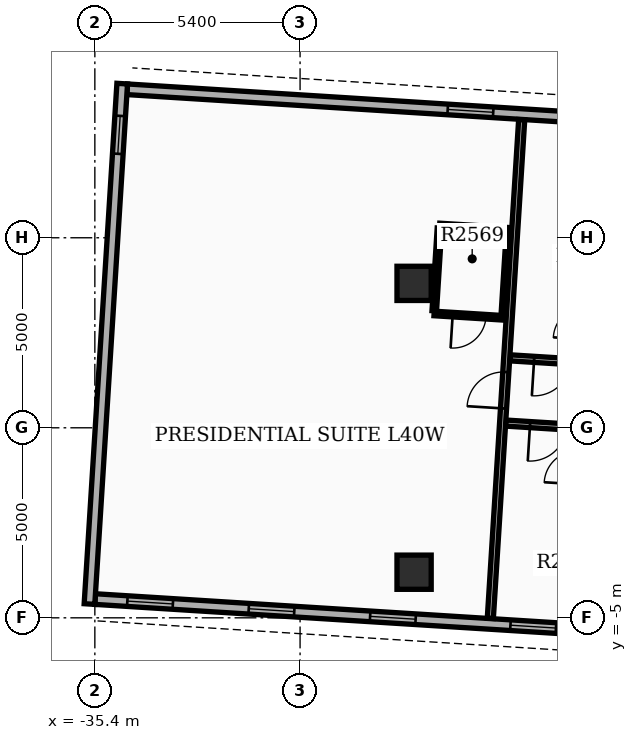
"""IFC4 building model, lengths in metres.
Left out: names, types, materials, properties, quantities, classifications, styles, units other than length and angle.
Written with IfcOpenShell. Run it as: python <this file> out.ifc"""

import sys

from ifc_helpers import new_model, si_unit, direction, frame, frame_2d, origin, origin_2d, place, context, subcontext, project, spatial, rectangle, extrude, element, fill, save


model = new_model("IFC4")
c1 = context("Model", 3, precision=1e-05, world=origin(), true_north=direction((0.0, 1.0)))
c2 = subcontext(c1, "Body", "Model", "MODEL_VIEW")
j1 = project(units=[si_unit("LENGTHUNIT", "METRE"), si_unit("PLANEANGLEUNIT", "RADIAN")], contexts=[c1])
p1 = place(None, origin())
s1 = spatial("IfcSite", under=j1, at=p1, CompositionType="ELEMENT")
p2 = place(p1, origin())
s2 = spatial("IfcBuilding", under=s1, at=p2, CompositionType="ELEMENT")
p3 = place(p2, frame((0.0, 0.0, 160.5)))
s3 = spatial("IfcBuildingStorey", under=s2, at=p3, CompositionType="ELEMENT", Elevation=160.5)
for number, where, z_axis, x_axis in (
    (1, (-27.0, -3.8, 0.0), (0.0, 0.0, 1.0), (1.0, 0.0, 0.0)),
    (2, (-27.0, 3.8, 0.0), (0.0, 0.0, 1.0), (1.0, 0.0, 0.0)),
):
    element("IfcColumn", number, at=place(p3, frame(where, z_axis=z_axis, x_axis=x_axis)), inside=s3, PredefinedType="COLUMN", context=c2, shape_type="SweptSolid", body=[
        extrude(rectangle(XDim=0.9, YDim=0.9, at=origin_2d()), origin(), (0.0, 0.0, 1.0), 3.9),
    ])
p4 = place(p3, frame((-14.489, 7.645, 0.0), z_axis=(0.0, 0.0, 1.0), x_axis=(-0.99802635503, 0.06279645424, 0.0)))
e3 = element("IfcWall", 3, at=p4, inside=s3, PredefinedType="STANDARD", context=c2, shape_type="SweptSolid", body=[
    extrude(rectangle(XDim=20.1, YDim=0.28, at=frame_2d((10.05, 0.0))), origin(), (0.0, 0.0, 1.0), 2.97),
])
p5 = place(p4, frame((0.85, 0.0, 0.8)))
e4 = element("IfcOpeningElement", 4, at=p5, cuts=e3, PredefinedType="OPENING", context=c2, shape_type="SweptSolid", body=[
    extrude(rectangle(XDim=1.2, YDim=1.6, at=frame_2d((0.6, 0.8))), frame((0.0, 0.15, 0.0), z_axis=(0.0, -1.0, 0.0), x_axis=(1.0, 0.0, 0.0)), (0.0, 0.0, 1.0), 0.3),
])
p6 = place(p4, frame((4.05, 0.0, 0.8)))
e5 = element("IfcOpeningElement", 5, at=p6, cuts=e3, PredefinedType="OPENING", context=c2, shape_type="SweptSolid", body=[
    extrude(rectangle(XDim=1.2, YDim=1.6, at=frame_2d((0.6, 0.8))), frame((0.0, 0.15, 0.0), z_axis=(0.0, -1.0, 0.0), x_axis=(1.0, 0.0, 0.0)), (0.0, 0.0, 1.0), 0.3),
])
p7 = place(p4, frame((7.25, 0.0, 0.8)))
e6 = element("IfcOpeningElement", 6, at=p7, cuts=e3, PredefinedType="OPENING", context=c2, shape_type="SweptSolid", body=[
    extrude(rectangle(XDim=1.2, YDim=1.6, at=frame_2d((0.6, 0.8))), frame((0.0, 0.15, 0.0), z_axis=(0.0, -1.0, 0.0), x_axis=(1.0, 0.0, 0.0)), (0.0, 0.0, 1.0), 0.3),
])
p8 = place(p4, frame((10.45, 0.0, 0.8)))
e7 = element("IfcOpeningElement", 7, at=p8, cuts=e3, PredefinedType="OPENING", context=c2, shape_type="SweptSolid", body=[
    extrude(rectangle(XDim=1.2, YDim=1.6, at=frame_2d((0.6, 0.8))), frame((0.0, 0.15, 0.0), z_axis=(0.0, -1.0, 0.0), x_axis=(1.0, 0.0, 0.0)), (0.0, 0.0, 1.0), 0.3),
])
p9 = place(p3, frame((-35.393, -4.507, 0.0), z_axis=(0.0, 0.0, 1.0), x_axis=(0.998027116198, -0.062784355807, 0.0)))
e8 = element("IfcWall", 8, at=p9, inside=s3, PredefinedType="STANDARD", context=c2, shape_type="SweptSolid", body=[
    extrude(rectangle(XDim=20.1, YDim=0.28, at=frame_2d((10.05, 0.0))), origin(), (0.0, 0.0, 1.0), 2.97),
])
p10 = place(p9, frame((0.85, 0.0, 0.8)))
e9 = element("IfcOpeningElement", 9, at=p10, cuts=e8, PredefinedType="OPENING", context=c2, shape_type="SweptSolid", body=[
    extrude(rectangle(XDim=1.2, YDim=1.6, at=frame_2d((0.6, 0.8))), frame((0.0, 0.15, 0.0), z_axis=(0.0, -1.0, 0.0), x_axis=(1.0, 0.0, 0.0)), (0.0, 0.0, 1.0), 0.3),
])
p11 = place(p9, frame((4.05, 0.0, 0.8)))
e10 = element("IfcOpeningElement", 10, at=p11, cuts=e8, PredefinedType="OPENING", context=c2, shape_type="SweptSolid", body=[
    extrude(rectangle(XDim=1.2, YDim=1.6, at=frame_2d((0.6, 0.8))), frame((0.0, 0.15, 0.0), z_axis=(0.0, -1.0, 0.0), x_axis=(1.0, 0.0, 0.0)), (0.0, 0.0, 1.0), 0.3),
])
p12 = place(p9, frame((7.25, 0.0, 0.8)))
e11 = element("IfcOpeningElement", 11, at=p12, cuts=e8, PredefinedType="OPENING", context=c2, shape_type="SweptSolid", body=[
    extrude(rectangle(XDim=1.2, YDim=1.6, at=frame_2d((0.6, 0.8))), frame((0.0, 0.15, 0.0), z_axis=(0.0, -1.0, 0.0), x_axis=(1.0, 0.0, 0.0)), (0.0, 0.0, 1.0), 0.3),
])
p13 = place(p9, frame((10.95, 0.0, 0.8)))
e12 = element("IfcOpeningElement", 12, at=p13, cuts=e8, PredefinedType="OPENING", context=c2, shape_type="SweptSolid", body=[
    extrude(rectangle(XDim=1.2, YDim=1.6, at=frame_2d((0.6, 0.8))), frame((0.0, 0.15, 0.0), z_axis=(0.0, -1.0, 0.0), x_axis=(1.0, 0.0, 0.0)), (0.0, 0.0, 1.0), 0.3),
])
p14 = place(p9, frame((16.35, 0.0, 0.0)))
e13 = element("IfcOpeningElement", 13, at=p14, cuts=e8, PredefinedType="OPENING", context=c2, shape_type="SweptSolid", body=[
    extrude(rectangle(XDim=0.96, YDim=2.1, at=frame_2d((0.48, 1.05))), frame((0.0, 0.15, 0.0), z_axis=(0.0, -1.0, 0.0), x_axis=(1.0, 0.0, 0.0)), (0.0, 0.0, 1.0), 0.3),
])
p15 = place(p3, frame((-34.68, 9.055, 0.0), z_axis=(0.0, 0.0, 1.0), x_axis=(-0.062797041623, -0.998026318072, 0.0)))
e14 = element("IfcWall", 14, at=p15, inside=s3, PredefinedType="STANDARD", context=c2, shape_type="SweptSolid", body=[
    extrude(rectangle(XDim=13.72, YDim=0.28, at=frame_2d((6.86, 0.0))), origin(), (0.0, 0.0, 1.0), 2.97),
])
p16 = place(p15, frame((0.85, 0.0, 0.85)))
e15 = element("IfcOpeningElement", 15, at=p16, cuts=e14, PredefinedType="OPENING", context=c2, shape_type="SweptSolid", body=[
    extrude(rectangle(XDim=1.0, YDim=1.5, at=frame_2d((0.5, 0.75))), frame((0.0, 0.15, 0.0), z_axis=(0.0, -1.0, 0.0), x_axis=(1.0, 0.0, 0.0)), (0.0, 0.0, 1.0), 0.3),
])
p17 = place(p3, frame((-14.802, 1.232, 0.0), z_axis=(0.0, 0.0, 1.0), x_axis=(-0.9980262432, 0.062798231534, 0.0)))
e16 = element("IfcWall", 16, at=p17, inside=s3, PredefinedType="PARTITIONING", context=c2, shape_type="SweptSolid", body=[
    extrude(rectangle(XDim=9.7, YDim=0.16, at=frame_2d((4.85, 0.0))), origin(), (0.0, 0.0, 1.0), 2.96),
])
p18 = place(p17, frame((2.575, 0.0, 0.0)))
e17 = element("IfcOpeningElement", 17, at=p18, cuts=e16, PredefinedType="OPENING", context=c2, shape_type="SweptSolid", body=[
    extrude(rectangle(XDim=0.96, YDim=2.15, at=frame_2d((0.48, 1.075))), frame((0.0, 0.09, 0.0), z_axis=(0.0, -1.0, 0.0), x_axis=(1.0, 0.0, 0.0)), (0.0, 0.0, 1.0), 0.18),
])
p19 = place(p17, frame((8.097, 0.0, 0.0)))
e18 = element("IfcOpeningElement", 18, at=p19, cuts=e16, PredefinedType="OPENING", context=c2, shape_type="SweptSolid", body=[
    extrude(rectangle(XDim=0.96, YDim=2.15, at=frame_2d((0.48, 1.075))), frame((0.0, 0.09, 0.0), z_axis=(0.0, -1.0, 0.0), x_axis=(1.0, 0.0, 0.0)), (0.0, 0.0, 1.0), 0.18),
])
p20 = place(p3, frame((-14.91, -0.485, 0.0), z_axis=(0.0, 0.0, 1.0), x_axis=(-0.998026342456, 0.062796654085, 0.0)))
e19 = element("IfcWall", 19, at=p20, inside=s3, PredefinedType="PARTITIONING", context=c2, shape_type="SweptSolid", body=[
    extrude(rectangle(XDim=9.7, YDim=0.16, at=frame_2d((4.85, 0.0))), origin(), (0.0, 0.0, 1.0), 2.96),
])
p21 = place(p20, frame((2.575, 0.0, 0.0)))
e20 = element("IfcOpeningElement", 20, at=p21, cuts=e19, PredefinedType="OPENING", context=c2, shape_type="SweptSolid", body=[
    extrude(rectangle(XDim=0.96, YDim=2.15, at=frame_2d((0.48, 1.075))), frame((0.0, 0.09, 0.0), z_axis=(0.0, -1.0, 0.0), x_axis=(1.0, 0.0, 0.0)), (0.0, 0.0, 1.0), 0.18),
])
p22 = place(p20, frame((8.097, 0.0, 0.0)))
e21 = element("IfcOpeningElement", 21, at=p22, cuts=e19, PredefinedType="OPENING", context=c2, shape_type="SweptSolid", body=[
    extrude(rectangle(XDim=0.96, YDim=2.15, at=frame_2d((0.48, 1.075))), frame((0.0, 0.09, 0.0), z_axis=(0.0, -1.0, 0.0), x_axis=(1.0, 0.0, 0.0)), (0.0, 0.0, 1.0), 0.18),
])
p23 = place(p3, frame((-24.994, -5.012, 0.0), z_axis=(0.0, 0.0, 1.0), x_axis=(0.062800362452, 0.998026109115, 0.0)))
e22 = element("IfcWall", 22, at=p23, inside=s3, PredefinedType="PARTITIONING", context=c2, shape_type="SweptSolid", body=[
    extrude(rectangle(XDim=13.144, YDim=0.16, at=frame_2d((6.572, 0.0))), origin(), (0.0, 0.0, 1.0), 2.96),
])
p24 = place(p23, frame((5.532, 0.0, 0.0)))
e23 = element("IfcOpeningElement", 23, at=p24, cuts=e22, PredefinedType="OPENING", context=c2, shape_type="SweptSolid", body=[
    extrude(rectangle(XDim=0.96, YDim=2.15, at=frame_2d((0.48, 1.075))), frame((0.0, 0.09, 0.0), z_axis=(0.0, -1.0, 0.0), x_axis=(1.0, 0.0, 0.0)), (0.0, 0.0, 1.0), 0.18),
])
p25 = place(p3, frame((-24.653, 2.964, 0.0), z_axis=(0.0, 0.0, 1.0), x_axis=(0.06283150573, 0.99802414895, 0.0)))
e24 = element("IfcWall", 24, at=p25, inside=s3, PredefinedType="PARTITIONING", context=c2, shape_type="SweptSolid", body=[
    extrude(rectangle(XDim=2.18, YDim=0.12, at=frame_2d((1.09, 0.0))), origin(), (0.0, 0.0, 1.0), 2.96),
])
p26 = place(p3, frame((-26.469, 3.078, 0.0), z_axis=(0.0, 0.0, 1.0), x_axis=(0.062824483344, 0.998024591026, 0.0)))
e25 = element("IfcWall", 25, at=p26, inside=s3, PredefinedType="PARTITIONING", context=c2, shape_type="SweptSolid", body=[
    extrude(rectangle(XDim=2.18, YDim=0.12, at=frame_2d((1.09, 0.0))), origin(), (0.0, 0.0, 1.0), 2.96),
])
p27 = place(p3, frame((-24.657, 2.894, 0.0), z_axis=(0.0, 0.0, 1.0), x_axis=(-0.998019030272, 0.062912758763, 0.0)))
e26 = element("IfcWall", 26, at=p27, inside=s3, PredefinedType="PARTITIONING", context=c2, shape_type="SweptSolid", body=[
    extrude(rectangle(XDim=1.82, YDim=0.12, at=frame_2d((0.91, 0.0))), origin(), (0.0, 0.0, 1.0), 2.96),
])
p28 = place(p27, frame((0.45, 0.0, 0.0)))
e27 = element("IfcOpeningElement", 27, at=p28, cuts=e26, PredefinedType="OPENING", context=c2, shape_type="SweptSolid", body=[
    extrude(rectangle(XDim=0.88, YDim=2.1, at=frame_2d((0.44, 1.05))), frame((0.0, 0.07, 0.0), z_axis=(0.0, -1.0, 0.0), x_axis=(1.0, 0.0, 0.0)), (0.0, 0.0, 1.0), 0.14),
])
p29 = place(p3, frame((-24.511, 5.209, 0.0), z_axis=(0.0, 0.0, 1.0), x_axis=(-0.998035839873, 0.062645529196, 0.0)))
e28 = element("IfcWall", 28, at=p29, inside=s3, PredefinedType="PARTITIONING", context=c2, shape_type="SweptSolid", body=[
    extrude(rectangle(XDim=1.82, YDim=0.12, at=frame_2d((0.91, 0.0))), origin(), (0.0, 0.0, 1.0), 2.96),
])
p30 = place(p8, origin())
e29 = element("IfcWindow", 29, at=p30, inside=s3, PartitioningType="SINGLE_PANEL", PredefinedType="WINDOW", context=c2, shape_type="SweptSolid", body=[
    extrude(rectangle(XDim=1.2, YDim=1.6, at=frame_2d((0.6, 0.8))), frame((0.0, 0.03, 0.0), z_axis=(0.0, -1.0, 0.0), x_axis=(1.0, 0.0, 0.0)), (0.0, 0.0, 1.0), 0.06),
])
fill(e7, e29)
p31 = place(p10, origin())
e30 = element("IfcWindow", 30, at=p31, inside=s3, PartitioningType="SINGLE_PANEL", PredefinedType="WINDOW", context=c2, shape_type="SweptSolid", body=[
    extrude(rectangle(XDim=1.2, YDim=1.6, at=frame_2d((0.6, 0.8))), frame((0.0, 0.03, 0.0), z_axis=(0.0, -1.0, 0.0), x_axis=(1.0, 0.0, 0.0)), (0.0, 0.0, 1.0), 0.06),
])
fill(e9, e30)
p32 = place(p11, origin())
e31 = element("IfcWindow", 31, at=p32, inside=s3, PartitioningType="SINGLE_PANEL", PredefinedType="WINDOW", context=c2, shape_type="SweptSolid", body=[
    extrude(rectangle(XDim=1.2, YDim=1.6, at=frame_2d((0.6, 0.8))), frame((0.0, 0.03, 0.0), z_axis=(0.0, -1.0, 0.0), x_axis=(1.0, 0.0, 0.0)), (0.0, 0.0, 1.0), 0.06),
])
fill(e10, e31)
p33 = place(p12, origin())
e32 = element("IfcWindow", 32, at=p33, inside=s3, PartitioningType="SINGLE_PANEL", PredefinedType="WINDOW", context=c2, shape_type="SweptSolid", body=[
    extrude(rectangle(XDim=1.2, YDim=1.6, at=frame_2d((0.6, 0.8))), frame((0.0, 0.03, 0.0), z_axis=(0.0, -1.0, 0.0), x_axis=(1.0, 0.0, 0.0)), (0.0, 0.0, 1.0), 0.06),
])
fill(e11, e32)
p34 = place(p13, origin())
e33 = element("IfcWindow", 33, at=p34, inside=s3, PartitioningType="SINGLE_PANEL", PredefinedType="WINDOW", context=c2, shape_type="SweptSolid", body=[
    extrude(rectangle(XDim=1.2, YDim=1.6, at=frame_2d((0.6, 0.8))), frame((0.0, 0.03, 0.0), z_axis=(0.0, -1.0, 0.0), x_axis=(1.0, 0.0, 0.0)), (0.0, 0.0, 1.0), 0.06),
])
fill(e12, e33)
p35 = place(p16, origin())
e34 = element("IfcWindow", 34, at=p35, inside=s3, PartitioningType="SINGLE_PANEL", PredefinedType="WINDOW", context=c2, shape_type="SweptSolid", body=[
    extrude(rectangle(XDim=1.0, YDim=1.5, at=frame_2d((0.5, 0.75))), frame((0.0, 0.03, 0.0), z_axis=(0.0, -1.0, 0.0), x_axis=(1.0, 0.0, 0.0)), (0.0, 0.0, 1.0), 0.06),
])
fill(e15, e34)
p36 = place(p19, origin())
e35 = element("IfcDoor", 35, at=p36, inside=s3, OperationType="SINGLE_SWING_RIGHT", PredefinedType="DOOR", context=c2, shape_type="SweptSolid", body=[
    extrude(rectangle(XDim=0.96, YDim=2.15, at=frame_2d((0.48, 1.075))), frame((0.0, 0.025, 0.0), z_axis=(0.0, -1.0, 0.0), x_axis=(1.0, 0.0, 0.0)), (0.0, 0.0, 1.0), 0.05),
])
fill(e18, e35)
p37 = place(p22, origin())
e36 = element("IfcDoor", 36, at=p37, inside=s3, OperationType="SINGLE_SWING_RIGHT", PredefinedType="DOOR", context=c2, shape_type="SweptSolid", body=[
    extrude(rectangle(XDim=0.96, YDim=2.15, at=frame_2d((0.48, 1.075))), frame((0.0, 0.025, 0.0), z_axis=(0.0, -1.0, 0.0), x_axis=(1.0, 0.0, 0.0)), (0.0, 0.0, 1.0), 0.05),
])
fill(e21, e36)
p38 = place(p24, origin())
e37 = element("IfcDoor", 37, at=p38, inside=s3, OperationType="SINGLE_SWING_LEFT", PredefinedType="DOOR", context=c2, shape_type="SweptSolid", body=[
    extrude(rectangle(XDim=0.96, YDim=2.15, at=frame_2d((0.48, 1.075))), frame((0.0, 0.025, 0.0), z_axis=(0.0, -1.0, 0.0), x_axis=(1.0, 0.0, 0.0)), (0.0, 0.0, 1.0), 0.05),
])
fill(e23, e37)
p39 = place(p28, origin())
e38 = element("IfcDoor", 38, at=p39, inside=s3, OperationType="SINGLE_SWING_RIGHT", PredefinedType="DOOR", context=c2, shape_type="SweptSolid", body=[
    extrude(rectangle(XDim=0.88, YDim=2.1, at=frame_2d((0.44, 1.05))), frame((0.0, 0.025, 0.0), z_axis=(0.0, -1.0, 0.0), x_axis=(1.0, 0.0, 0.0)), (0.0, 0.0, 1.0), 0.05),
])
fill(e27, e38)
save(model, sys.argv[1])
